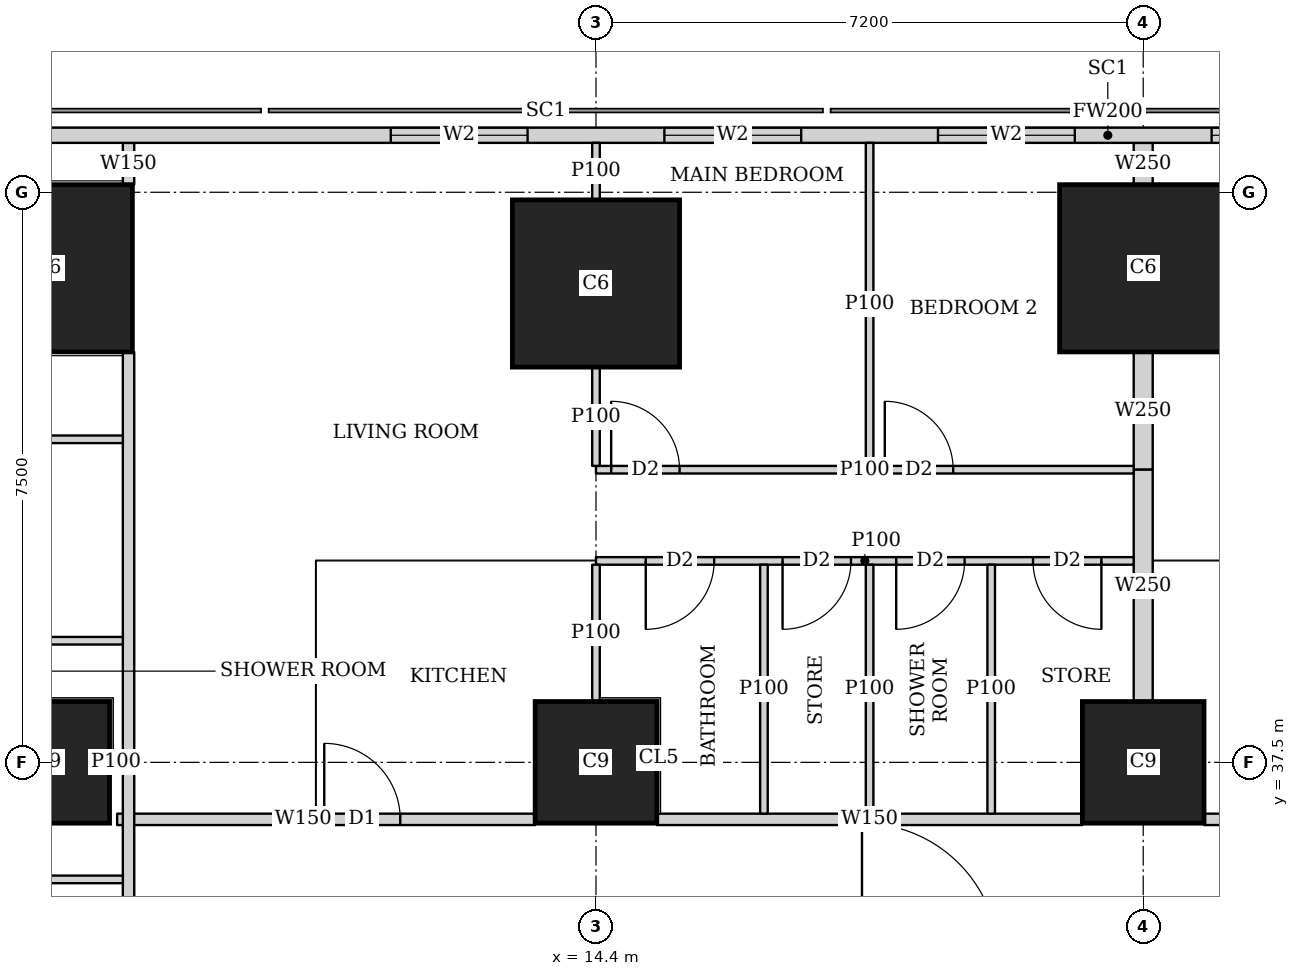
"""IFC4 building model, lengths in metres.
Left out: names, types, materials, properties, quantities, classifications, styles, units other than length and angle.
Written with IfcOpenShell. Run it as: python <this file> out.ifc"""

import sys

from ifc_helpers import new_model, si_unit, direction, frame, frame_2d, origin, origin_2d, place, context, subcontext, project, spatial, rectangle, extrude, element, fill, save


model = new_model("IFC4")
c1 = context("Model", 3, precision=1e-05, world=origin(), true_north=direction((0.0, 1.0)))
c2 = subcontext(c1, "Body", "Model", "MODEL_VIEW")
j1 = project(units=[si_unit("LENGTHUNIT", "METRE"), si_unit("PLANEANGLEUNIT", "RADIAN")], contexts=[c1])
p1 = place(None, origin())
s1 = spatial("IfcSite", under=j1, at=p1, CompositionType="ELEMENT")
p2 = place(p1, origin())
s2 = spatial("IfcBuilding", under=s1, at=p2, CompositionType="ELEMENT")
p3 = place(p2, frame((0.0, 0.0, 126.65)))
s3 = spatial("IfcBuildingStorey", under=s2, at=p3, CompositionType="ELEMENT", Elevation=126.65)
for number, where, z_axis, x_axis in (
    (1, (7.2, 37.5, 0.0), (0.0, 0.0, 1.0), (1.0, 0.0, 0.0)),
    (2, (14.4, 37.5, 0.0), (0.0, 0.0, 1.0), (1.0, 0.0, 0.0)),
    (3, (21.6, 37.5, 0.0), (0.0, 0.0, 1.0), (1.0, 0.0, 0.0)),
):
    element("IfcColumn", number, at=place(p3, frame(where, z_axis=z_axis, x_axis=x_axis)), inside=s3, PredefinedType="COLUMN", context=c2, shape_type="SweptSolid", body=[
        extrude(rectangle(XDim=1.6, YDim=1.6, at=origin_2d()), origin(), (0.0, 0.0, 1.0), 3.75),
    ])
for number, where, z_axis, x_axis in (
    (4, (7.2, 44.0, 0.0), (0.0, 0.0, 1.0), (1.0, 0.0, 0.0)),
    (5, (14.4, 43.8, 0.0), (0.0, 0.0, 1.0), (1.0, 0.0, 0.0)),
    (6, (21.6, 44.0, 0.0), (0.0, 0.0, 1.0), (1.0, 0.0, 0.0)),
):
    element("IfcColumn", number, at=place(p3, frame(where, z_axis=z_axis, x_axis=x_axis)), inside=s3, PredefinedType="COLUMN", context=c2, shape_type="SweptSolid", body=[
        extrude(rectangle(XDim=2.2, YDim=2.2, at=origin_2d()), origin(), (0.0, 0.0, 1.0), 3.75),
    ])
p4 = place(p3, frame((40.106, 45.75, 0.0), z_axis=(0.0, 0.0, 1.0), x_axis=(-1.0, 0.0, 0.0)))
e7 = element("IfcWall", 7, at=p4, inside=s3, PredefinedType="SOLIDWALL", context=c2, shape_type="SweptSolid", body=[
    extrude(rectangle(XDim=37.943, YDim=0.2, at=frame_2d((18.971, 0.0))), origin(), (0.0, 0.0, 1.0), 3.45),
])
p5 = place(p4, frame((8.606, 0.0, 0.9)))
e8 = element("IfcOpeningElement", 8, at=p5, cuts=e7, PredefinedType="OPENING", context=c2, shape_type="SweptSolid", body=[
    extrude(rectangle(XDim=1.8, YDim=1.5, at=frame_2d((0.9, 0.75))), frame((0.0, 0.11, 0.0), z_axis=(0.0, -1.0, 0.0), x_axis=(1.0, 0.0, 0.0)), (0.0, 0.0, 1.0), 0.22),
])
p6 = place(p4, frame((12.206, 0.0, 0.9)))
e9 = element("IfcOpeningElement", 9, at=p6, cuts=e7, PredefinedType="OPENING", context=c2, shape_type="SweptSolid", body=[
    extrude(rectangle(XDim=1.8, YDim=1.5, at=frame_2d((0.9, 0.75))), frame((0.0, 0.11, 0.0), z_axis=(0.0, -1.0, 0.0), x_axis=(1.0, 0.0, 0.0)), (0.0, 0.0, 1.0), 0.22),
])
p7 = place(p4, frame((15.806, 0.0, 0.9)))
e10 = element("IfcOpeningElement", 10, at=p7, cuts=e7, PredefinedType="OPENING", context=c2, shape_type="SweptSolid", body=[
    extrude(rectangle(XDim=1.8, YDim=1.5, at=frame_2d((0.9, 0.75))), frame((0.0, 0.11, 0.0), z_axis=(0.0, -1.0, 0.0), x_axis=(1.0, 0.0, 0.0)), (0.0, 0.0, 1.0), 0.22),
])
p8 = place(p4, frame((19.406, 0.0, 0.9)))
e11 = element("IfcOpeningElement", 11, at=p8, cuts=e7, PredefinedType="OPENING", context=c2, shape_type="SweptSolid", body=[
    extrude(rectangle(XDim=1.8, YDim=1.5, at=frame_2d((0.9, 0.75))), frame((0.0, 0.11, 0.0), z_axis=(0.0, -1.0, 0.0), x_axis=(1.0, 0.0, 0.0)), (0.0, 0.0, 1.0), 0.22),
])
p9 = place(p4, frame((23.006, 0.0, 0.9)))
e12 = element("IfcOpeningElement", 12, at=p9, cuts=e7, PredefinedType="OPENING", context=c2, shape_type="SweptSolid", body=[
    extrude(rectangle(XDim=1.8, YDim=1.5, at=frame_2d((0.9, 0.75))), frame((0.0, 0.11, 0.0), z_axis=(0.0, -1.0, 0.0), x_axis=(1.0, 0.0, 0.0)), (0.0, 0.0, 1.0), 0.22),
])
p10 = place(p4, frame((26.606, 0.0, 0.9)))
e13 = element("IfcOpeningElement", 13, at=p10, cuts=e7, PredefinedType="OPENING", context=c2, shape_type="SweptSolid", body=[
    extrude(rectangle(XDim=1.8, YDim=1.5, at=frame_2d((0.9, 0.75))), frame((0.0, 0.11, 0.0), z_axis=(0.0, -1.0, 0.0), x_axis=(1.0, 0.0, 0.0)), (0.0, 0.0, 1.0), 0.22),
])
p11 = place(p3, frame((8.25, 2.126, 0.0), z_axis=(0.0, 0.0, 1.0), x_axis=(0.0, 1.0, 0.0)))
e14 = element("IfcWall", 14, at=p11, inside=s3, PredefinedType="SOLIDWALL", context=c2, shape_type="SweptSolid", body=[
    extrude(rectangle(XDim=40.773, YDim=0.15, at=frame_2d((20.386, 0.0))), origin(), (0.0, 0.0, 1.0), 3.45),
])
p12 = place(p11, frame((10.286, 0.0, 0.0)))
e15 = element("IfcOpeningElement", 15, at=p12, cuts=e14, PredefinedType="OPENING", context=c2, shape_type="SweptSolid", body=[
    extrude(rectangle(XDim=1.0, YDim=2.1, at=frame_2d((0.5, 1.05))), frame((0.0, 0.085, 0.0), z_axis=(0.0, -1.0, 0.0), x_axis=(1.0, 0.0, 0.0)), (0.0, 0.0, 1.0), 0.17),
])
p13 = place(p11, frame((14.461, 0.0, 0.0)))
e16 = element("IfcOpeningElement", 16, at=p13, cuts=e14, PredefinedType="OPENING", context=c2, shape_type="SweptSolid", body=[
    extrude(rectangle(XDim=1.0, YDim=2.1, at=frame_2d((0.5, 1.05))), frame((0.0, 0.085, 0.0), z_axis=(0.0, -1.0, 0.0), x_axis=(1.0, 0.0, 0.0)), (0.0, 0.0, 1.0), 0.17),
])
p14 = place(p11, frame((21.962, 0.0, 0.0)))
e17 = element("IfcOpeningElement", 17, at=p14, cuts=e14, PredefinedType="OPENING", context=c2, shape_type="SweptSolid", body=[
    extrude(rectangle(XDim=1.0, YDim=2.1, at=frame_2d((0.5, 1.05))), frame((0.0, 0.085, 0.0), z_axis=(0.0, -1.0, 0.0), x_axis=(1.0, 0.0, 0.0)), (0.0, 0.0, 1.0), 0.17),
])
p15 = place(p11, frame((29.461, 0.0, 0.0)))
e18 = element("IfcOpeningElement", 18, at=p15, cuts=e14, PredefinedType="OPENING", context=c2, shape_type="SweptSolid", body=[
    extrude(rectangle(XDim=1.0, YDim=2.1, at=frame_2d((0.5, 1.05))), frame((0.0, 0.085, 0.0), z_axis=(0.0, -1.0, 0.0), x_axis=(1.0, 0.0, 0.0)), (0.0, 0.0, 1.0), 0.17),
])
p16 = place(p3, frame((8.25, 45.101, 0.0), z_axis=(0.0, 0.0, 1.0), x_axis=(0.0, 1.0, 0.0)))
e19 = element("IfcWall", 19, at=p16, inside=s3, PredefinedType="SOLIDWALL", context=c2, shape_type="SweptSolid", body=[
    extrude(rectangle(XDim=0.549, YDim=0.15, at=frame_2d((0.274, 0.0))), origin(), (0.0, 0.0, 1.0), 3.45),
])
p17 = place(p3, frame((8.1, 36.75, 0.0), z_axis=(0.0, 0.0, 1.0), x_axis=(1.0, 0.0, 0.0)))
e20 = element("IfcWall", 20, at=p17, inside=s3, PredefinedType="SOLIDWALL", context=c2, shape_type="SweptSolid", body=[
    extrude(rectangle(XDim=5.499, YDim=0.15, at=frame_2d((2.75, 0.0))), origin(), (0.0, 0.0, 1.0), 3.45),
])
p18 = place(p17, frame((2.725, 0.0, 0.0)))
e21 = element("IfcOpeningElement", 21, at=p18, cuts=e20, PredefinedType="OPENING", context=c2, shape_type="SweptSolid", body=[
    extrude(rectangle(XDim=1.0, YDim=2.1, at=frame_2d((0.5, 1.05))), frame((0.0, 0.085, 0.0), z_axis=(0.0, -1.0, 0.0), x_axis=(1.0, 0.0, 0.0)), (0.0, 0.0, 1.0), 0.17),
])
p19 = place(p3, frame((15.201, 36.75, 0.0), z_axis=(0.0, 0.0, 1.0), x_axis=(1.0, 0.0, 0.0)))
e22 = element("IfcWall", 22, at=p19, inside=s3, PredefinedType="SOLIDWALL", context=c2, shape_type="SweptSolid", body=[
    extrude(rectangle(XDim=5.598, YDim=0.15, at=frame_2d((2.799, 0.0))), origin(), (0.0, 0.0, 1.0), 3.45),
])
p20 = place(p3, frame((22.401, 36.75, 0.0), z_axis=(0.0, 0.0, 1.0), x_axis=(1.0, 0.0, 0.0)))
e23 = element("IfcWall", 23, at=p20, inside=s3, PredefinedType="SOLIDWALL", context=c2, shape_type="SweptSolid", body=[
    extrude(rectangle(XDim=5.598, YDim=0.15, at=frame_2d((2.799, 0.0))), origin(), (0.0, 0.0, 1.0), 3.45),
])
p21 = place(p20, frame((0.699, 0.0, 0.0)))
e24 = element("IfcOpeningElement", 24, at=p21, cuts=e23, PredefinedType="OPENING", context=c2, shape_type="SweptSolid", body=[
    extrude(rectangle(XDim=1.0, YDim=2.1, at=frame_2d((0.5, 1.05))), frame((0.0, 0.085, 0.0), z_axis=(0.0, -1.0, 0.0), x_axis=(1.0, 0.0, 0.0)), (0.0, 0.0, 1.0), 0.17),
])
p22 = place(p3, frame((8.001, 37.5, 0.0), z_axis=(0.0, 0.0, 1.0), x_axis=(1.0, 0.0, 0.0)))
e25 = element("IfcWall", 25, at=p22, inside=s3, PredefinedType="PARTITIONING", context=c2, shape_type="SweptSolid", body=[
    extrude(rectangle(XDim=0.174, YDim=0.1, at=frame_2d((0.087, 0.0))), origin(), (0.0, 0.0, 1.0), 3.45),
])
for number, where, z_axis, x_axis in (
    (26, (4.9, 35.96, 0.0), (0.0, 0.0, 1.0), (1.0, 0.0, 0.0)),
    (27, (4.9, 39.1, 0.0), (0.0, 0.0, 1.0), (1.0, 0.0, 0.0)),
):
    element("IfcWall", number, at=place(p3, frame(where, z_axis=z_axis, x_axis=x_axis)), inside=s3, PredefinedType="PARTITIONING", context=c2, shape_type="SweptSolid", body=[
        extrude(rectangle(XDim=3.275, YDim=0.1, at=frame_2d((1.638, 0.0))), origin(), (0.0, 0.0, 1.0), 3.45),
    ])
p23 = place(p3, frame((14.4, 41.35, 0.0), z_axis=(0.0, 0.0, 1.0), x_axis=(1.0, 0.0, 0.0)))
e28 = element("IfcWall", 28, at=p23, inside=s3, PredefinedType="PARTITIONING", context=c2, shape_type="SweptSolid", body=[
    extrude(rectangle(XDim=7.075, YDim=0.1, at=frame_2d((3.538, 0.0))), origin(), (0.0, 0.0, 1.0), 3.45),
])
p24 = place(p23, frame((0.2, 0.0, 0.0)))
e29 = element("IfcOpeningElement", 29, at=p24, cuts=e28, PredefinedType="OPENING", context=c2, shape_type="SweptSolid", body=[
    extrude(rectangle(XDim=0.9, YDim=2.1, at=frame_2d((0.45, 1.05))), frame((0.0, 0.06, 0.0), z_axis=(0.0, -1.0, 0.0), x_axis=(1.0, 0.0, 0.0)), (0.0, 0.0, 1.0), 0.12),
])
p25 = place(p23, frame((3.8, 0.0, 0.0)))
e30 = element("IfcOpeningElement", 30, at=p25, cuts=e28, PredefinedType="OPENING", context=c2, shape_type="SweptSolid", body=[
    extrude(rectangle(XDim=0.9, YDim=2.1, at=frame_2d((0.45, 1.05))), frame((0.0, 0.06, 0.0), z_axis=(0.0, -1.0, 0.0), x_axis=(1.0, 0.0, 0.0)), (0.0, 0.0, 1.0), 0.12),
])
p26 = place(p3, frame((14.4, 40.15, 0.0), z_axis=(0.0, 0.0, 1.0), x_axis=(1.0, 0.0, 0.0)))
e31 = element("IfcWall", 31, at=p26, inside=s3, PredefinedType="PARTITIONING", context=c2, shape_type="SweptSolid", body=[
    extrude(rectangle(XDim=7.075, YDim=0.1, at=frame_2d((3.538, 0.0))), origin(), (0.0, 0.0, 1.0), 3.45),
])
p27 = place(p26, frame((0.655, 0.0, 0.0)))
e32 = element("IfcOpeningElement", 32, at=p27, cuts=e31, PredefinedType="OPENING", context=c2, shape_type="SweptSolid", body=[
    extrude(rectangle(XDim=0.9, YDim=2.1, at=frame_2d((0.45, 1.05))), frame((0.0, 0.06, 0.0), z_axis=(0.0, -1.0, 0.0), x_axis=(1.0, 0.0, 0.0)), (0.0, 0.0, 1.0), 0.12),
])
p28 = place(p26, frame((3.95, 0.0, 0.0)))
e33 = element("IfcOpeningElement", 33, at=p28, cuts=e31, PredefinedType="OPENING", context=c2, shape_type="SweptSolid", body=[
    extrude(rectangle(XDim=0.9, YDim=2.1, at=frame_2d((0.45, 1.05))), frame((0.0, 0.06, 0.0), z_axis=(0.0, -1.0, 0.0), x_axis=(1.0, 0.0, 0.0)), (0.0, 0.0, 1.0), 0.12),
])
p29 = place(p26, frame((2.455, 0.0, 0.0)))
e34 = element("IfcOpeningElement", 34, at=p29, cuts=e31, PredefinedType="OPENING", context=c2, shape_type="SweptSolid", body=[
    extrude(rectangle(XDim=0.9, YDim=2.1, at=frame_2d((0.45, 1.05))), frame((0.0, 0.06, 0.0), z_axis=(0.0, -1.0, 0.0), x_axis=(1.0, 0.0, 0.0)), (0.0, 0.0, 1.0), 0.12),
])
p30 = place(p26, frame((5.75, 0.0, 0.0)))
e35 = element("IfcOpeningElement", 35, at=p30, cuts=e31, PredefinedType="OPENING", context=c2, shape_type="SweptSolid", body=[
    extrude(rectangle(XDim=0.9, YDim=2.1, at=frame_2d((0.45, 1.05))), frame((0.0, 0.06, 0.0), z_axis=(0.0, -1.0, 0.0), x_axis=(1.0, 0.0, 0.0)), (0.0, 0.0, 1.0), 0.12),
])
p31 = place(p3, frame((14.4, 41.4, 0.0), z_axis=(0.0, 0.0, 1.0), x_axis=(0.0, 1.0, 0.0)))
e36 = element("IfcWall", 36, at=p31, inside=s3, PredefinedType="PARTITIONING", context=c2, shape_type="SweptSolid", body=[
    extrude(rectangle(XDim=1.299, YDim=0.1, at=frame_2d((0.649, 0.0))), origin(), (0.0, 0.0, 1.0), 3.45),
])
p32 = place(p3, frame((14.4, 44.901, 0.0), z_axis=(0.0, 0.0, 1.0), x_axis=(0.0, 1.0, 0.0)))
e37 = element("IfcWall", 37, at=p32, inside=s3, PredefinedType="PARTITIONING", context=c2, shape_type="SweptSolid", body=[
    extrude(rectangle(XDim=0.749, YDim=0.1, at=frame_2d((0.375, 0.0))), origin(), (0.0, 0.0, 1.0), 3.45),
])
p33 = place(p3, frame((18.0, 41.4, 0.0), z_axis=(0.0, 0.0, 1.0), x_axis=(0.0, 1.0, 0.0)))
e38 = element("IfcWall", 38, at=p33, inside=s3, PredefinedType="PARTITIONING", context=c2, shape_type="SweptSolid", body=[
    extrude(rectangle(XDim=4.25, YDim=0.1, at=frame_2d((2.125, 0.0))), origin(), (0.0, 0.0, 1.0), 2.15),
])
p34 = place(p3, frame((14.4, 38.301, 0.0), z_axis=(0.0, 0.0, 1.0), x_axis=(0.0, 1.0, 0.0)))
e39 = element("IfcWall", 39, at=p34, inside=s3, PredefinedType="PARTITIONING", context=c2, shape_type="SweptSolid", body=[
    extrude(rectangle(XDim=1.799, YDim=0.1, at=frame_2d((0.899, 0.0))), origin(), (0.0, 0.0, 1.0), 3.45),
])
for number, where, z_axis, x_axis in (
    (40, (18.0, 36.825, 0.0), (0.0, 0.0, 1.0), (0.0, 1.0, 0.0)),
    (41, (16.61, 36.825, 0.0), (0.0, 0.0, 1.0), (0.0, 1.0, 0.0)),
    (42, (19.6, 36.825, 0.0), (0.0, 0.0, 1.0), (0.0, 1.0, 0.0)),
):
    element("IfcWall", number, at=place(p3, frame(where, z_axis=z_axis, x_axis=x_axis)), inside=s3, PredefinedType="PARTITIONING", context=c2, shape_type="SweptSolid", body=[
        extrude(rectangle(XDim=3.275, YDim=0.1, at=frame_2d((1.638, 0.0))), origin(), (0.0, 0.0, 1.0), 3.45),
    ])
p35 = place(p3, frame((21.6, 41.35, 0.0), z_axis=(0.0, 0.0, 1.0), x_axis=(0.0, 1.0, 0.0)))
e43 = element("IfcWall", 43, at=p35, inside=s3, PredefinedType="SOLIDWALL", context=c2, shape_type="SweptSolid", body=[
    extrude(rectangle(XDim=1.549, YDim=0.25, at=frame_2d((0.774, 0.0))), origin(), (0.0, 0.0, 1.0), 3.45),
])
p36 = place(p3, frame((21.6, 45.101, 0.0), z_axis=(0.0, 0.0, 1.0), x_axis=(0.0, 1.0, 0.0)))
e44 = element("IfcWall", 44, at=p36, inside=s3, PredefinedType="SOLIDWALL", context=c2, shape_type="SweptSolid", body=[
    extrude(rectangle(XDim=0.549, YDim=0.25, at=frame_2d((0.274, 0.0))), origin(), (0.0, 0.0, 1.0), 3.45),
])
p37 = place(p3, frame((21.6, 38.301, 0.0), z_axis=(0.0, 0.0, 1.0), x_axis=(0.0, 1.0, 0.0)))
e45 = element("IfcWall", 45, at=p37, inside=s3, PredefinedType="SOLIDWALL", context=c2, shape_type="SweptSolid", body=[
    extrude(rectangle(XDim=3.049, YDim=0.25, at=frame_2d((1.524, 0.0))), origin(), (0.0, 0.0, 1.0), 3.45),
])
p38 = place(p3, frame((8.175, 41.75, 0.0), z_axis=(0.0, 0.0, 1.0), x_axis=(-1.0, 0.0, 0.0)))
e46 = element("IfcWall", 46, at=p38, inside=s3, PredefinedType="PARTITIONING", context=c2, shape_type="SweptSolid", body=[
    extrude(rectangle(XDim=3.275, YDim=0.1, at=frame_2d((1.638, 0.0))), origin(), (0.0, 0.0, 1.0), 3.45),
])
p39 = place(p38, frame((2.1, 0.0, 0.0)))
e47 = element("IfcOpeningElement", 47, at=p39, cuts=e46, PredefinedType="OPENING", context=c2, shape_type="SweptSolid", body=[
    extrude(rectangle(XDim=0.9, YDim=2.1, at=frame_2d((0.45, 1.05))), frame((0.0, 0.06, 0.0), z_axis=(0.0, -1.0, 0.0), x_axis=(1.0, 0.0, 0.0)), (0.0, 0.0, 1.0), 0.12),
])
p40 = place(p7, origin())
e48 = element("IfcWindow", 48, at=p40, inside=s3, PartitioningType="SINGLE_PANEL", PredefinedType="WINDOW", context=c2, shape_type="SweptSolid", body=[
    extrude(rectangle(XDim=1.8, YDim=1.5, at=frame_2d((0.9, 0.75))), frame((0.0, 0.03, 0.0), z_axis=(0.0, -1.0, 0.0), x_axis=(1.0, 0.0, 0.0)), (0.0, 0.0, 1.0), 0.06),
])
fill(e10, e48)
p41 = place(p8, origin())
e49 = element("IfcWindow", 49, at=p41, inside=s3, PartitioningType="SINGLE_PANEL", PredefinedType="WINDOW", context=c2, shape_type="SweptSolid", body=[
    extrude(rectangle(XDim=1.8, YDim=1.5, at=frame_2d((0.9, 0.75))), frame((0.0, 0.03, 0.0), z_axis=(0.0, -1.0, 0.0), x_axis=(1.0, 0.0, 0.0)), (0.0, 0.0, 1.0), 0.06),
])
fill(e11, e49)
p42 = place(p9, origin())
e50 = element("IfcWindow", 50, at=p42, inside=s3, PartitioningType="SINGLE_PANEL", PredefinedType="WINDOW", context=c2, shape_type="SweptSolid", body=[
    extrude(rectangle(XDim=1.8, YDim=1.5, at=frame_2d((0.9, 0.75))), frame((0.0, 0.03, 0.0), z_axis=(0.0, -1.0, 0.0), x_axis=(1.0, 0.0, 0.0)), (0.0, 0.0, 1.0), 0.06),
])
fill(e12, e50)
p43 = place(p10, origin())
e51 = element("IfcWindow", 51, at=p43, inside=s3, PartitioningType="SINGLE_PANEL", PredefinedType="WINDOW", context=c2, shape_type="SweptSolid", body=[
    extrude(rectangle(XDim=1.8, YDim=1.5, at=frame_2d((0.9, 0.75))), frame((0.0, 0.03, 0.0), z_axis=(0.0, -1.0, 0.0), x_axis=(1.0, 0.0, 0.0)), (0.0, 0.0, 1.0), 0.06),
])
fill(e13, e51)
p44 = place(p24, origin())
e52 = element("IfcDoor", 52, at=p44, inside=s3, OperationType="SINGLE_SWING_LEFT", PredefinedType="DOOR", context=c2, shape_type="SweptSolid", body=[
    extrude(rectangle(XDim=0.9, YDim=2.1, at=frame_2d((0.45, 1.05))), frame((0.0, 0.025, 0.0), z_axis=(0.0, -1.0, 0.0), x_axis=(1.0, 0.0, 0.0)), (0.0, 0.0, 1.0), 0.05),
])
fill(e29, e52)
p45 = place(p25, origin())
e53 = element("IfcDoor", 53, at=p45, inside=s3, OperationType="SINGLE_SWING_LEFT", PredefinedType="DOOR", context=c2, shape_type="SweptSolid", body=[
    extrude(rectangle(XDim=0.9, YDim=2.1, at=frame_2d((0.45, 1.05))), frame((0.0, 0.025, 0.0), z_axis=(0.0, -1.0, 0.0), x_axis=(1.0, 0.0, 0.0)), (0.0, 0.0, 1.0), 0.05),
])
fill(e30, e53)
p46 = place(p27, origin())
e54 = element("IfcDoor", 54, at=p46, inside=s3, OperationType="SINGLE_SWING_RIGHT", PredefinedType="DOOR", context=c2, shape_type="SweptSolid", body=[
    extrude(rectangle(XDim=0.9, YDim=2.1, at=frame_2d((0.45, 1.05))), frame((0.0, 0.025, 0.0), z_axis=(0.0, -1.0, 0.0), x_axis=(1.0, 0.0, 0.0)), (0.0, 0.0, 1.0), 0.05),
])
fill(e32, e54)
p47 = place(p28, origin())
e55 = element("IfcDoor", 55, at=p47, inside=s3, OperationType="SINGLE_SWING_RIGHT", PredefinedType="DOOR", context=c2, shape_type="SweptSolid", body=[
    extrude(rectangle(XDim=0.9, YDim=2.1, at=frame_2d((0.45, 1.05))), frame((0.0, 0.025, 0.0), z_axis=(0.0, -1.0, 0.0), x_axis=(1.0, 0.0, 0.0)), (0.0, 0.0, 1.0), 0.05),
])
fill(e33, e55)
p48 = place(p29, origin())
e56 = element("IfcDoor", 56, at=p48, inside=s3, OperationType="SINGLE_SWING_RIGHT", PredefinedType="DOOR", context=c2, shape_type="SweptSolid", body=[
    extrude(rectangle(XDim=0.9, YDim=2.1, at=frame_2d((0.45, 1.05))), frame((0.0, 0.025, 0.0), z_axis=(0.0, -1.0, 0.0), x_axis=(1.0, 0.0, 0.0)), (0.0, 0.0, 1.0), 0.05),
])
fill(e34, e56)
p49 = place(p30, origin())
e57 = element("IfcDoor", 57, at=p49, inside=s3, OperationType="SINGLE_SWING_LEFT", PredefinedType="DOOR", context=c2, shape_type="SweptSolid", body=[
    extrude(rectangle(XDim=0.9, YDim=2.1, at=frame_2d((0.45, 1.05))), frame((0.0, 0.025, 0.0), z_axis=(0.0, -1.0, 0.0), x_axis=(1.0, 0.0, 0.0)), (0.0, 0.0, 1.0), 0.05),
])
fill(e35, e57)
p50 = place(p18, origin())
e58 = element("IfcDoor", 58, at=p50, inside=s3, OperationType="SINGLE_SWING_LEFT", PredefinedType="DOOR", context=c2, shape_type="SweptSolid", body=[
    extrude(rectangle(XDim=1.0, YDim=2.1, at=frame_2d((0.5, 1.05))), frame((0.0, 0.025, 0.0), z_axis=(0.0, -1.0, 0.0), x_axis=(1.0, 0.0, 0.0)), (0.0, 0.0, 1.0), 0.05),
])
fill(e21, e58)
save(model, sys.argv[1])
